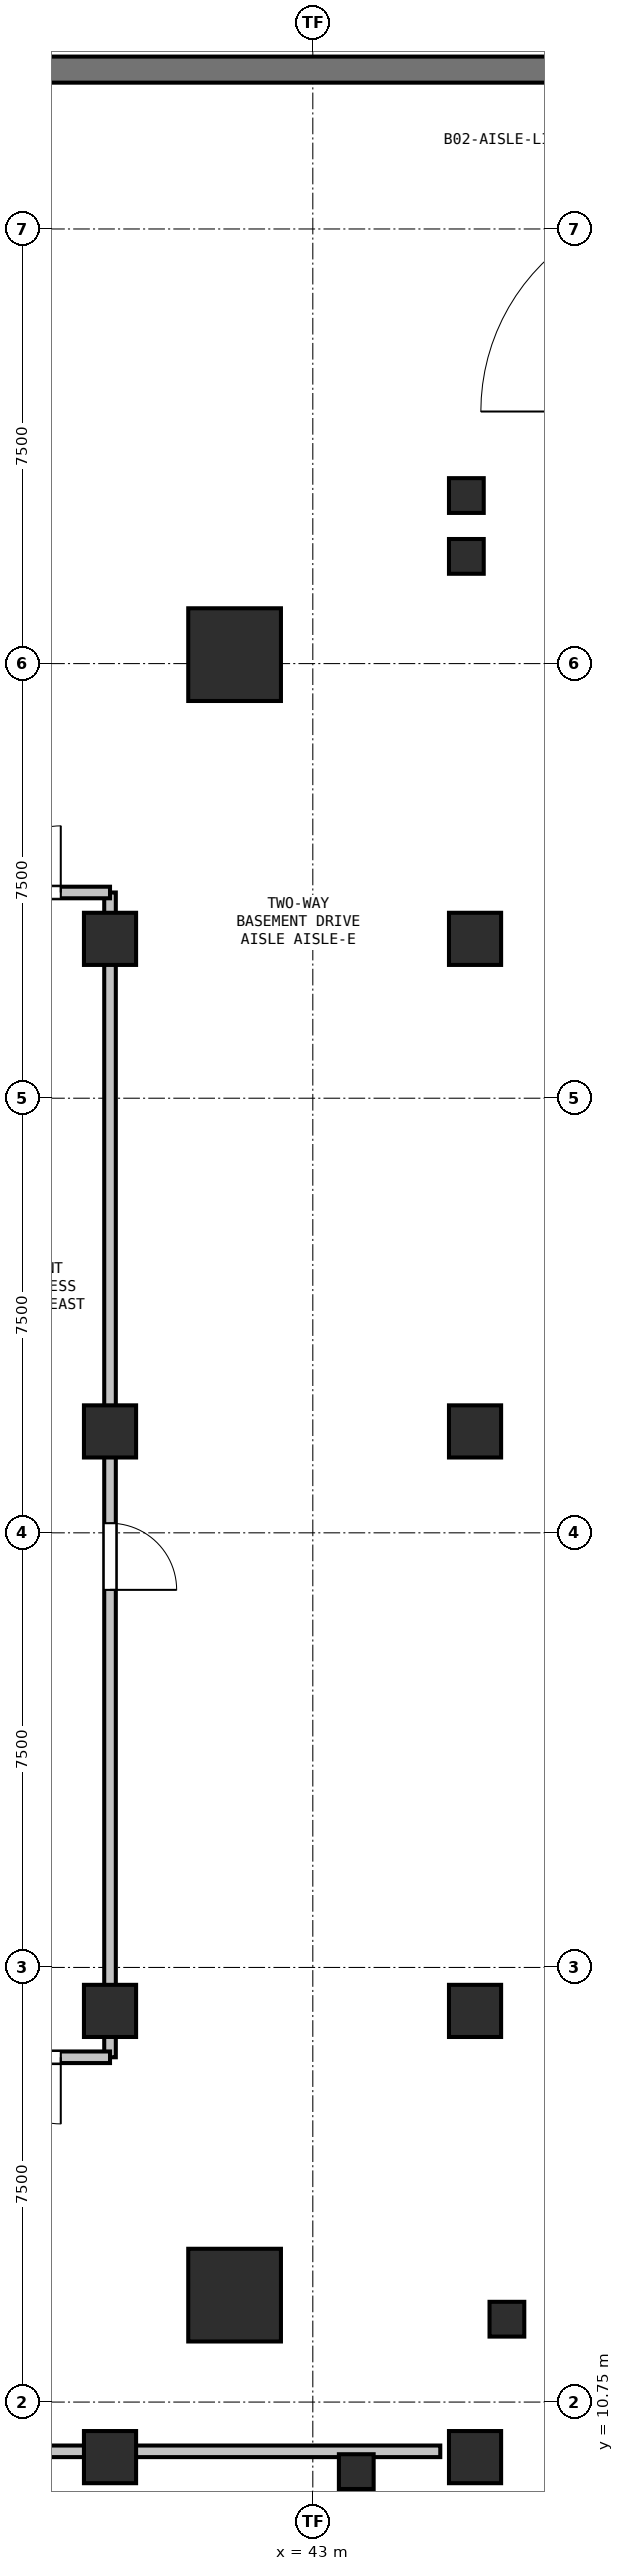
"""IFC4 building model, lengths in metres.
Left out: names, types, materials, properties, quantities, classifications, styles, units other than length and angle.
Written with IfcOpenShell. Run it as: python <this file> out.ifc"""

import sys

from ifc_helpers import new_model, si_unit, direction, frame, frame_2d, origin, origin_2d, place, context, subcontext, project, spatial, rectangle, hollow_rectangle, extrude, element, fill, save


model = new_model("IFC4")
c1 = context("Model", 3, precision=1e-05, world=origin(), true_north=direction((0.0, 1.0)))
c2 = subcontext(c1, "Body", "Model", "MODEL_VIEW")
j1 = project(units=[si_unit("LENGTHUNIT", "METRE"), si_unit("PLANEANGLEUNIT", "RADIAN")], contexts=[c1])
p1 = place(None, origin())
s1 = spatial("IfcSite", under=j1, at=p1, CompositionType="ELEMENT")
p2 = place(p1, origin())
s2 = spatial("IfcBuilding", under=s1, at=p2, CompositionType="ELEMENT")
p3 = place(p2, frame((0.0, 0.0, -9.0)))
s3 = spatial("IfcBuildingStorey", under=s2, at=p3, CompositionType="ELEMENT", Elevation=-9.0)
p4 = place(p3, frame((77.0, 51.0, 0.0), z_axis=(0.0, 0.0, 1.0), x_axis=(-1.0, 0.0, 0.0)))
e1 = element("IfcWall", 1, at=p4, inside=s3, PredefinedType="USERDEFINED", context=c2, shape_type="SweptSolid", body=[
    extrude(rectangle(XDim=81.5, YDim=0.45, at=frame_2d((40.75, 0.0))), origin(), (0.0, 0.0, 1.0), 4.5),
])
for number, where, z_axis, x_axis in (
    (2, (41.65, 40.905, 0.0), (0.0, 0.0, 1.0), (1.0, 0.0, 0.0)),
    (3, (41.65, 12.595, 0.0), (0.0, 0.0, 1.0), (1.0, 0.0, 0.0)),
):
    element("IfcColumn", number, at=place(p3, frame(where, z_axis=z_axis, x_axis=x_axis)), inside=s3, PredefinedType="COLUMN", context=c2, shape_type="SweptSolid", body=[
        extrude(hollow_rectangle(XDim=1.6, YDim=1.6, WallThickness=0.04, at=origin_2d()), origin(), (0.0, 0.0, 1.0), 4.5),
    ])
for number, where, z_axis, x_axis in (
    (4, (45.65, 42.6, 0.0), (0.0, 0.0, 1.0), (1.0, 0.0, 0.0)),
    (5, (45.65, 43.65, 0.0), (0.0, 0.0, 1.0), (1.0, 0.0, 0.0)),
):
    element("IfcColumn", number, at=place(p3, frame(where, z_axis=z_axis, x_axis=x_axis)), inside=s3, PredefinedType="COLUMN", context=c2, shape_type="SweptSolid", body=[
        extrude(rectangle(XDim=0.6, YDim=0.6, at=origin_2d()), origin(), (0.0, 0.0, 1.0), 4.5),
    ])
for number, where, z_axis, x_axis in (
    (6, (39.5, 9.8, 0.0), (0.0, 0.0, 1.0), (1.0, 0.0, 0.0)),
    (7, (39.5, 17.5, 0.0), (0.0, 0.0, 1.0), (1.0, 0.0, 0.0)),
    (8, (39.5, 27.5, 0.0), (0.0, 0.0, 1.0), (1.0, 0.0, 0.0)),
    (9, (39.5, 36.0, 0.0), (0.0, 0.0, 1.0), (1.0, 0.0, 0.0)),
    (10, (45.8, 9.8, 0.0), (0.0, 0.0, 1.0), (1.0, 0.0, 0.0)),
    (11, (45.8, 17.5, 0.0), (0.0, 0.0, 1.0), (1.0, 0.0, 0.0)),
    (12, (45.8, 27.5, 0.0), (0.0, 0.0, 1.0), (1.0, 0.0, 0.0)),
    (13, (45.8, 36.0, 0.0), (0.0, 0.0, 1.0), (1.0, 0.0, 0.0)),
):
    element("IfcColumn", number, at=place(p3, frame(where, z_axis=z_axis, x_axis=x_axis)), inside=s3, PredefinedType="COLUMN", context=c2, shape_type="SweptSolid", body=[
        extrude(rectangle(XDim=0.9, YDim=0.9, at=origin_2d()), origin(), (0.0, 0.0, 1.0), 4.5),
    ])
p5 = place(p3, frame((43.75, 9.55, 0.0), z_axis=(0.0, 0.0, 1.0), x_axis=(1.0, 0.0, 0.0)))
e14 = element("IfcColumn", 14, at=p5, inside=s3, PredefinedType="COLUMN", context=c2, shape_type="SweptSolid", body=[
    extrude(rectangle(XDim=0.6, YDim=0.6, at=origin_2d()), origin(), (0.0, 0.0, 1.0), 4.2),
])
p6 = place(p3, frame((46.35, 12.18, 0.0), z_axis=(0.0, 0.0, 1.0), x_axis=(1.0, 0.0, 0.0)))
e15 = element("IfcColumn", 15, at=p6, inside=s3, PredefinedType="COLUMN", context=c2, shape_type="SweptSolid", body=[
    extrude(rectangle(XDim=0.6, YDim=0.6, at=origin_2d()), origin(), (0.0, 0.0, 1.0), 3.82),
])
p7 = place(p3, frame((11.85, 9.9, 0.0), z_axis=(0.0, 0.0, 1.0), x_axis=(1.0, 0.0, 0.0)))
e16 = element("IfcWall", 16, at=p7, inside=s3, PredefinedType="PARAPET", context=c2, shape_type="SweptSolid", body=[
    extrude(rectangle(XDim=33.35, YDim=0.2, at=frame_2d((16.675, 0.0))), origin(), (0.0, 0.0, 1.0), 5.75),
])
p8 = place(p3, frame((39.5, 36.8, 0.0), z_axis=(0.0, 0.0, 1.0), x_axis=(0.0, -1.0, 0.0)))
e17 = element("IfcWall", 17, at=p8, inside=s3, PredefinedType="PARTITIONING", context=c2, shape_type="SweptSolid", body=[
    extrude(rectangle(XDim=20.1, YDim=0.2, at=frame_2d((10.05, 0.0))), origin(), (0.0, 0.0, 1.0), 4.2),
])
p9 = place(p8, frame((10.884, 0.0, 0.0)))
e18 = element("IfcOpeningElement", 18, at=p9, cuts=e17, PredefinedType="OPENING", context=c2, shape_type="SweptSolid", body=[
    extrude(rectangle(XDim=1.15, YDim=2.15, at=frame_2d((0.575, 1.075))), frame((0.0, 0.11, 0.0), z_axis=(0.0, -1.0, 0.0), x_axis=(1.0, 0.0, 0.0)), (0.0, 0.0, 1.0), 0.22),
])
p10 = place(p3, frame((39.5, 16.7, 0.0), z_axis=(0.0, 0.0, 1.0), x_axis=(-1.0, 0.0, 0.0)))
e19 = element("IfcWall", 19, at=p10, inside=s3, PredefinedType="PARTITIONING", context=c2, shape_type="SweptSolid", body=[
    extrude(rectangle(XDim=2.85, YDim=0.2, at=frame_2d((1.425, 0.0))), origin(), (0.0, 0.0, 1.0), 4.2),
])
p11 = place(p10, frame((0.85, 0.0, 0.0)))
e20 = element("IfcOpeningElement", 20, at=p11, cuts=e19, PredefinedType="OPENING", context=c2, shape_type="SweptSolid", body=[
    extrude(rectangle(XDim=1.15, YDim=2.15, at=frame_2d((0.575, 1.075))), frame((0.0, 0.11, 0.0), z_axis=(0.0, -1.0, 0.0), x_axis=(1.0, 0.0, 0.0)), (0.0, 0.0, 1.0), 0.22),
])
p12 = place(p3, frame((36.65, 36.8, 0.0), z_axis=(0.0, 0.0, 1.0), x_axis=(1.0, 0.0, 0.0)))
e21 = element("IfcWall", 21, at=p12, inside=s3, PredefinedType="PARTITIONING", context=c2, shape_type="SweptSolid", body=[
    extrude(rectangle(XDim=2.85, YDim=0.2, at=frame_2d((1.425, 0.0))), origin(), (0.0, 0.0, 1.0), 4.2),
])
p13 = place(p12, frame((0.85, 0.0, 0.0)))
e22 = element("IfcOpeningElement", 22, at=p13, cuts=e21, PredefinedType="OPENING", context=c2, shape_type="SweptSolid", body=[
    extrude(rectangle(XDim=1.15, YDim=2.15, at=frame_2d((0.575, 1.075))), frame((0.0, 0.11, 0.0), z_axis=(0.0, -1.0, 0.0), x_axis=(1.0, 0.0, 0.0)), (0.0, 0.0, 1.0), 0.22),
])
p14 = place(p9, origin())
e23 = element("IfcDoor", 23, at=p14, inside=s3, OperationType="SINGLE_SWING_RIGHT", PredefinedType="DOOR", context=c2, shape_type="SweptSolid", body=[
    extrude(rectangle(XDim=1.15, YDim=2.15, at=frame_2d((0.575, 1.075))), frame((0.0, 0.025, 0.0), z_axis=(0.0, -1.0, 0.0), x_axis=(1.0, 0.0, 0.0)), (0.0, 0.0, 1.0), 0.05),
])
fill(e18, e23)
p15 = place(p11, origin())
e24 = element("IfcDoor", 24, at=p15, inside=s3, OperationType="SINGLE_SWING_LEFT", PredefinedType="DOOR", context=c2, shape_type="SweptSolid", body=[
    extrude(rectangle(XDim=1.15, YDim=2.15, at=frame_2d((0.575, 1.075))), frame((0.0, 0.025, 0.0), z_axis=(0.0, -1.0, 0.0), x_axis=(1.0, 0.0, 0.0)), (0.0, 0.0, 1.0), 0.05),
])
fill(e20, e24)
p16 = place(p13, origin())
e25 = element("IfcDoor", 25, at=p16, inside=s3, OperationType="SINGLE_SWING_RIGHT", PredefinedType="DOOR", context=c2, shape_type="SweptSolid", body=[
    extrude(rectangle(XDim=1.15, YDim=2.15, at=frame_2d((0.575, 1.075))), frame((0.0, 0.025, 0.0), z_axis=(0.0, -1.0, 0.0), x_axis=(1.0, 0.0, 0.0)), (0.0, 0.0, 1.0), 0.05),
])
fill(e22, e25)
save(model, sys.argv[1])
